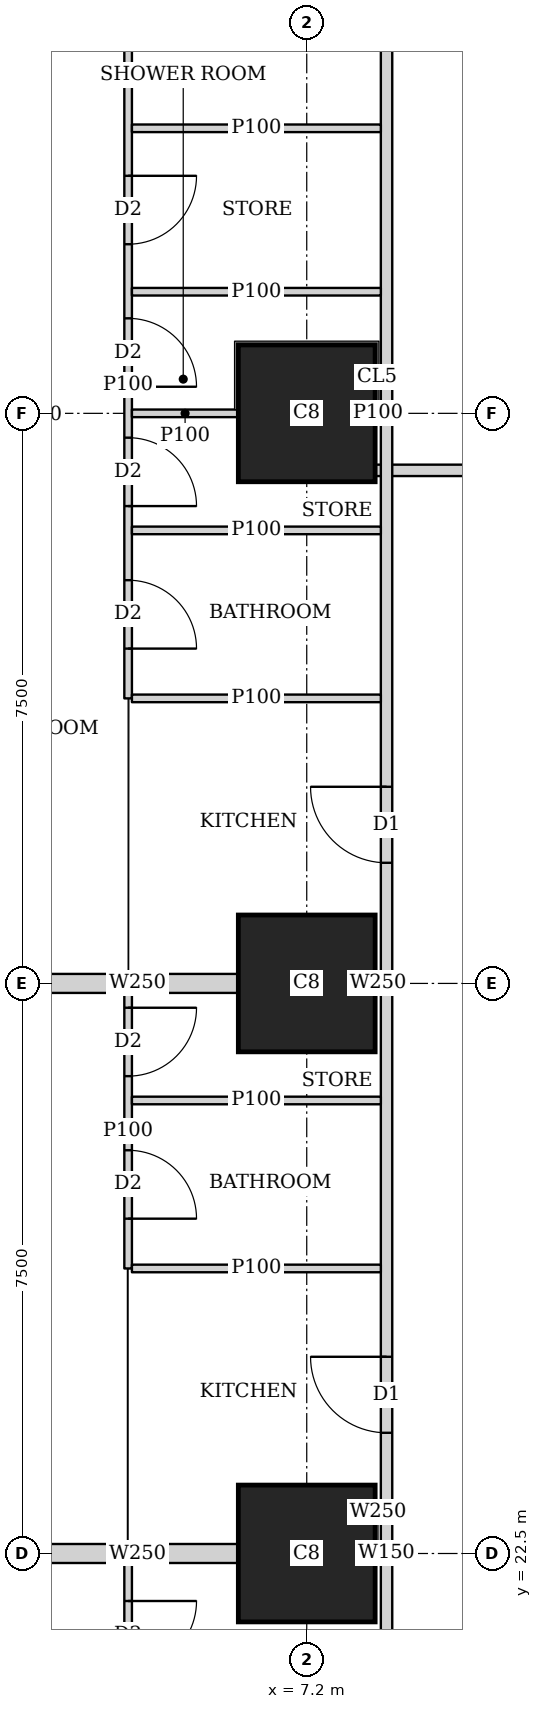
"""IFC4 building model, lengths in metres.
Left out: names, types, materials, properties, quantities, classifications, styles, units other than length and angle.
Written with IfcOpenShell. Run it as: python <this file> out.ifc"""

import sys

from ifc_helpers import new_model, si_unit, direction, frame, frame_2d, origin, origin_2d, place, context, subcontext, project, spatial, rectangle, extrude, element, fill, save


model = new_model("IFC4")
c1 = context("Model", 3, precision=1e-05, world=origin(), true_north=direction((0.0, 1.0)))
c2 = subcontext(c1, "Body", "Model", "MODEL_VIEW")
j1 = project(units=[si_unit("LENGTHUNIT", "METRE"), si_unit("PLANEANGLEUNIT", "RADIAN")], contexts=[c1])
p1 = place(None, origin())
s1 = spatial("IfcSite", under=j1, at=p1, CompositionType="ELEMENT")
p2 = place(p1, origin())
s2 = spatial("IfcBuilding", under=s1, at=p2, CompositionType="ELEMENT")
p3 = place(p2, frame((0.0, 0.0, 53.75)))
s3 = spatial("IfcBuildingStorey", under=s2, at=p3, CompositionType="ELEMENT", Elevation=53.75)
for number, where, z_axis, x_axis in (
    (1, (7.2, 22.5, 0.0), (0.0, 0.0, 1.0), (1.0, 0.0, 0.0)),
    (2, (7.2, 30.0, 0.0), (0.0, 0.0, 1.0), (1.0, 0.0, 0.0)),
    (3, (7.2, 37.5, 0.0), (0.0, 0.0, 1.0), (1.0, 0.0, 0.0)),
):
    element("IfcColumn", number, at=place(p3, frame(where, z_axis=z_axis, x_axis=x_axis)), inside=s3, PredefinedType="COLUMN", context=c2, shape_type="SweptSolid", body=[
        extrude(rectangle(XDim=1.8, YDim=1.8, at=origin_2d()), origin(), (0.0, 0.0, 1.0), 3.75),
    ])
p4 = place(p3, frame((8.25, 2.426, 0.0), z_axis=(0.0, 0.0, 1.0), x_axis=(0.0, 1.0, 0.0)))
e4 = element("IfcWall", 4, at=p4, inside=s3, PredefinedType="SOLIDWALL", context=c2, shape_type="SweptSolid", body=[
    extrude(rectangle(XDim=40.173, YDim=0.15, at=frame_2d((20.086, 0.0))), origin(), (0.0, 0.0, 1.0), 3.5),
])
p5 = place(p4, frame((6.661, 0.0, 0.0)))
e5 = element("IfcOpeningElement", 5, at=p5, cuts=e4, PredefinedType="OPENING", context=c2, shape_type="SweptSolid", body=[
    extrude(rectangle(XDim=1.0, YDim=2.1, at=frame_2d((0.5, 1.05))), frame((0.0, 0.085, 0.0), z_axis=(0.0, -1.0, 0.0), x_axis=(1.0, 0.0, 0.0)), (0.0, 0.0, 1.0), 0.17),
])
p6 = place(p4, frame((9.986, 0.0, 0.0)))
e6 = element("IfcOpeningElement", 6, at=p6, cuts=e4, PredefinedType="OPENING", context=c2, shape_type="SweptSolid", body=[
    extrude(rectangle(XDim=1.0, YDim=2.1, at=frame_2d((0.5, 1.05))), frame((0.0, 0.085, 0.0), z_axis=(0.0, -1.0, 0.0), x_axis=(1.0, 0.0, 0.0)), (0.0, 0.0, 1.0), 0.17),
])
p7 = place(p4, frame((21.662, 0.0, 0.0)))
e7 = element("IfcOpeningElement", 7, at=p7, cuts=e4, PredefinedType="OPENING", context=c2, shape_type="SweptSolid", body=[
    extrude(rectangle(XDim=1.0, YDim=2.1, at=frame_2d((0.5, 1.05))), frame((0.0, 0.085, 0.0), z_axis=(0.0, -1.0, 0.0), x_axis=(1.0, 0.0, 0.0)), (0.0, 0.0, 1.0), 0.17),
])
p8 = place(p4, frame((29.161, 0.0, 0.0)))
e8 = element("IfcOpeningElement", 8, at=p8, cuts=e4, PredefinedType="OPENING", context=c2, shape_type="SweptSolid", body=[
    extrude(rectangle(XDim=1.0, YDim=2.1, at=frame_2d((0.5, 1.05))), frame((0.0, 0.085, 0.0), z_axis=(0.0, -1.0, 0.0), x_axis=(1.0, 0.0, 0.0)), (0.0, 0.0, 1.0), 0.17),
])
p9 = place(p3, frame((8.1, 36.75, 0.0), z_axis=(0.0, 0.0, 1.0), x_axis=(1.0, 0.0, 0.0)))
e9 = element("IfcWall", 9, at=p9, inside=s3, PredefinedType="SOLIDWALL", context=c2, shape_type="SweptSolid", body=[
    extrude(rectangle(XDim=5.399, YDim=0.15, at=frame_2d((2.699, 0.0))), origin(), (0.0, 0.0, 1.0), 3.5),
])
p10 = place(p9, frame((2.725, 0.0, 0.0)))
e10 = element("IfcOpeningElement", 10, at=p10, cuts=e9, PredefinedType="OPENING", context=c2, shape_type="SweptSolid", body=[
    extrude(rectangle(XDim=1.0, YDim=2.1, at=frame_2d((0.5, 1.05))), frame((0.0, 0.085, 0.0), z_axis=(0.0, -1.0, 0.0), x_axis=(1.0, 0.0, 0.0)), (0.0, 0.0, 1.0), 0.17),
])
p11 = place(p3, frame((4.85, 15.0, 0.0), z_axis=(0.0, 0.0, 1.0), x_axis=(0.0, 1.0, 0.0)))
e11 = element("IfcWall", 11, at=p11, inside=s3, PredefinedType="PARTITIONING", context=c2, shape_type="SweptSolid", body=[
    extrude(rectangle(XDim=7.375, YDim=0.1, at=frame_2d((3.688, 0.0))), origin(), (0.0, 0.0, 1.0), 3.5),
])
p12 = place(p11, frame((0.655, 0.0, 0.0)))
e12 = element("IfcOpeningElement", 12, at=p12, cuts=e11, PredefinedType="OPENING", context=c2, shape_type="SweptSolid", body=[
    extrude(rectangle(XDim=0.9, YDim=2.1, at=frame_2d((0.45, 1.05))), frame((0.0, 0.06, 0.0), z_axis=(0.0, -1.0, 0.0), x_axis=(1.0, 0.0, 0.0)), (0.0, 0.0, 1.0), 0.12),
])
p13 = place(p11, frame((4.1, 0.0, 0.0)))
e13 = element("IfcOpeningElement", 13, at=p13, cuts=e11, PredefinedType="OPENING", context=c2, shape_type="SweptSolid", body=[
    extrude(rectangle(XDim=0.9, YDim=2.1, at=frame_2d((0.45, 1.05))), frame((0.0, 0.06, 0.0), z_axis=(0.0, -1.0, 0.0), x_axis=(1.0, 0.0, 0.0)), (0.0, 0.0, 1.0), 0.12),
])
p14 = place(p11, frame((2.53, 0.0, 0.0)))
e14 = element("IfcOpeningElement", 14, at=p14, cuts=e11, PredefinedType="OPENING", context=c2, shape_type="SweptSolid", body=[
    extrude(rectangle(XDim=0.9, YDim=2.1, at=frame_2d((0.45, 1.05))), frame((0.0, 0.06, 0.0), z_axis=(0.0, -1.0, 0.0), x_axis=(1.0, 0.0, 0.0)), (0.0, 0.0, 1.0), 0.12),
])
p15 = place(p11, frame((5.975, 0.0, 0.0)))
e15 = element("IfcOpeningElement", 15, at=p15, cuts=e11, PredefinedType="OPENING", context=c2, shape_type="SweptSolid", body=[
    extrude(rectangle(XDim=0.9, YDim=2.1, at=frame_2d((0.45, 1.05))), frame((0.0, 0.06, 0.0), z_axis=(0.0, -1.0, 0.0), x_axis=(1.0, 0.0, 0.0)), (0.0, 0.0, 1.0), 0.12),
])
p16 = place(p3, frame((4.85, 26.25, 0.0), z_axis=(0.0, 0.0, 1.0), x_axis=(0.0, 1.0, 0.0)))
e16 = element("IfcWall", 16, at=p16, inside=s3, PredefinedType="PARTITIONING", context=c2, shape_type="SweptSolid", body=[
    extrude(rectangle(XDim=3.625, YDim=0.1, at=frame_2d((1.812, 0.0))), origin(), (0.0, 0.0, 1.0), 3.5),
])
p17 = place(p16, frame((0.655, 0.0, 0.0)))
e17 = element("IfcOpeningElement", 17, at=p17, cuts=e16, PredefinedType="OPENING", context=c2, shape_type="SweptSolid", body=[
    extrude(rectangle(XDim=0.9, YDim=2.1, at=frame_2d((0.45, 1.05))), frame((0.0, 0.06, 0.0), z_axis=(0.0, -1.0, 0.0), x_axis=(1.0, 0.0, 0.0)), (0.0, 0.0, 1.0), 0.12),
])
p18 = place(p16, frame((2.53, 0.0, 0.0)))
e18 = element("IfcOpeningElement", 18, at=p18, cuts=e16, PredefinedType="OPENING", context=c2, shape_type="SweptSolid", body=[
    extrude(rectangle(XDim=0.9, YDim=2.1, at=frame_2d((0.45, 1.05))), frame((0.0, 0.06, 0.0), z_axis=(0.0, -1.0, 0.0), x_axis=(1.0, 0.0, 0.0)), (0.0, 0.0, 1.0), 0.12),
])
for number, where, z_axis, x_axis in (
    (19, (4.9, 26.25, 0.0), (0.0, 0.0, 1.0), (1.0, 0.0, 0.0)),
    (20, (4.9, 28.46, 0.0), (0.0, 0.0, 1.0), (1.0, 0.0, 0.0)),
):
    element("IfcWall", number, at=place(p3, frame(where, z_axis=z_axis, x_axis=x_axis)), inside=s3, PredefinedType="PARTITIONING", context=c2, shape_type="SweptSolid", body=[
        extrude(rectangle(XDim=3.275, YDim=0.1, at=frame_2d((1.638, 0.0))), origin(), (0.0, 0.0, 1.0), 3.5),
    ])
p19 = place(p3, frame((3.65, 22.5, 0.0), z_axis=(0.0, 0.0, 1.0), x_axis=(1.0, 0.0, 0.0)))
e21 = element("IfcWall", 21, at=p19, inside=s3, PredefinedType="SOLIDWALL", context=c2, shape_type="SweptSolid", body=[
    extrude(rectangle(XDim=2.649, YDim=0.25, at=frame_2d((1.325, 0.0))), origin(), (0.0, 0.0, 1.0), 3.5),
])
p20 = place(p3, frame((8.101, 22.5, 0.0), z_axis=(0.0, 0.0, 1.0), x_axis=(1.0, 0.0, 0.0)))
e22 = element("IfcWall", 22, at=p20, inside=s3, PredefinedType="SOLIDWALL", context=c2, shape_type="SweptSolid", body=[
    extrude(rectangle(XDim=0.074, YDim=0.25, at=frame_2d((0.037, 0.0))), origin(), (0.0, 0.0, 1.0), 3.5),
])
p21 = place(p3, frame((4.85, 33.75, 0.0), z_axis=(0.0, 0.0, 1.0), x_axis=(0.0, 1.0, 0.0)))
e23 = element("IfcWall", 23, at=p21, inside=s3, PredefinedType="PARTITIONING", context=c2, shape_type="SweptSolid", body=[
    extrude(rectangle(XDim=8.244, YDim=0.1, at=frame_2d((4.122, 0.0))), origin(), (0.0, 0.0, 1.0), 3.5),
])
p22 = place(p21, frame((0.655, 0.0, 0.0)))
e24 = element("IfcOpeningElement", 24, at=p22, cuts=e23, PredefinedType="OPENING", context=c2, shape_type="SweptSolid", body=[
    extrude(rectangle(XDim=0.9, YDim=2.1, at=frame_2d((0.45, 1.05))), frame((0.0, 0.06, 0.0), z_axis=(0.0, -1.0, 0.0), x_axis=(1.0, 0.0, 0.0)), (0.0, 0.0, 1.0), 0.12),
])
p23 = place(p21, frame((4.1, 0.0, 0.0)))
e25 = element("IfcOpeningElement", 25, at=p23, cuts=e23, PredefinedType="OPENING", context=c2, shape_type="SweptSolid", body=[
    extrude(rectangle(XDim=0.9, YDim=2.1, at=frame_2d((0.45, 1.05))), frame((0.0, 0.06, 0.0), z_axis=(0.0, -1.0, 0.0), x_axis=(1.0, 0.0, 0.0)), (0.0, 0.0, 1.0), 0.12),
])
p24 = place(p21, frame((2.53, 0.0, 0.0)))
e26 = element("IfcOpeningElement", 26, at=p24, cuts=e23, PredefinedType="OPENING", context=c2, shape_type="SweptSolid", body=[
    extrude(rectangle(XDim=0.9, YDim=2.1, at=frame_2d((0.45, 1.05))), frame((0.0, 0.06, 0.0), z_axis=(0.0, -1.0, 0.0), x_axis=(1.0, 0.0, 0.0)), (0.0, 0.0, 1.0), 0.12),
])
p25 = place(p21, frame((5.975, 0.0, 0.0)))
e27 = element("IfcOpeningElement", 27, at=p25, cuts=e23, PredefinedType="OPENING", context=c2, shape_type="SweptSolid", body=[
    extrude(rectangle(XDim=0.9, YDim=2.1, at=frame_2d((0.45, 1.05))), frame((0.0, 0.06, 0.0), z_axis=(0.0, -1.0, 0.0), x_axis=(1.0, 0.0, 0.0)), (0.0, 0.0, 1.0), 0.12),
])
p26 = place(p3, frame((4.85, 41.994, 0.0), z_axis=(0.0, 0.0, 1.0), x_axis=(0.0, 1.0, 0.0)))
e28 = element("IfcWall", 28, at=p26, inside=s3, PredefinedType="PARTITIONING", context=c2, shape_type="SweptSolid", body=[
    extrude(rectangle(XDim=2.901, YDim=0.1, at=frame_2d((1.451, 0.0))), origin(), (0.0, 0.0, 1.0), 2.05),
])
p27 = place(p3, frame((4.9, 33.75, 0.0), z_axis=(0.0, 0.0, 1.0), x_axis=(1.0, 0.0, 0.0)))
e29 = element("IfcWall", 29, at=p27, inside=s3, PredefinedType="PARTITIONING", context=c2, shape_type="SweptSolid", body=[
    extrude(rectangle(XDim=3.275, YDim=0.1, at=frame_2d((1.638, 0.0))), origin(), (0.0, 0.0, 1.0), 3.5),
])
p28 = place(p3, frame((4.9, 37.5, 0.0), z_axis=(0.0, 0.0, 1.0), x_axis=(1.0, 0.0, 0.0)))
e30 = element("IfcWall", 30, at=p28, inside=s3, PredefinedType="PARTITIONING", context=c2, shape_type="SweptSolid", body=[
    extrude(rectangle(XDim=1.399, YDim=0.1, at=frame_2d((0.7, 0.0))), origin(), (0.0, 0.0, 1.0), 3.5),
])
p29 = place(p3, frame((8.101, 37.5, 0.0), z_axis=(0.0, 0.0, 1.0), x_axis=(1.0, 0.0, 0.0)))
e31 = element("IfcWall", 31, at=p29, inside=s3, PredefinedType="PARTITIONING", context=c2, shape_type="SweptSolid", body=[
    extrude(rectangle(XDim=0.074, YDim=0.1, at=frame_2d((0.037, 0.0))), origin(), (0.0, 0.0, 1.0), 3.5),
])
for number, where, z_axis, x_axis in (
    (32, (4.9, 41.25, 0.0), (0.0, 0.0, 1.0), (1.0, 0.0, 0.0)),
    (33, (4.9, 35.96, 0.0), (0.0, 0.0, 1.0), (1.0, 0.0, 0.0)),
    (34, (4.9, 39.1, 0.0), (0.0, 0.0, 1.0), (1.0, 0.0, 0.0)),
):
    element("IfcWall", number, at=place(p3, frame(where, z_axis=z_axis, x_axis=x_axis)), inside=s3, PredefinedType="PARTITIONING", context=c2, shape_type="SweptSolid", body=[
        extrude(rectangle(XDim=3.275, YDim=0.1, at=frame_2d((1.638, 0.0))), origin(), (0.0, 0.0, 1.0), 3.5),
    ])
p30 = place(p3, frame((3.65, 30.0, 0.0), z_axis=(0.0, 0.0, 1.0), x_axis=(1.0, 0.0, 0.0)))
e35 = element("IfcWall", 35, at=p30, inside=s3, PredefinedType="SOLIDWALL", context=c2, shape_type="SweptSolid", body=[
    extrude(rectangle(XDim=2.649, YDim=0.25, at=frame_2d((1.325, 0.0))), origin(), (0.0, 0.0, 1.0), 3.5),
])
p31 = place(p3, frame((8.101, 30.0, 0.0), z_axis=(0.0, 0.0, 1.0), x_axis=(1.0, 0.0, 0.0)))
e36 = element("IfcWall", 36, at=p31, inside=s3, PredefinedType="SOLIDWALL", context=c2, shape_type="SweptSolid", body=[
    extrude(rectangle(XDim=0.074, YDim=0.25, at=frame_2d((0.037, 0.0))), origin(), (0.0, 0.0, 1.0), 3.5),
])
p32 = place(p15, origin())
e37 = element("IfcDoor", 37, at=p32, inside=s3, OperationType="SINGLE_SWING_LEFT", PredefinedType="DOOR", context=c2, shape_type="SweptSolid", body=[
    extrude(rectangle(XDim=0.9, YDim=2.1, at=frame_2d((0.45, 1.05))), frame((0.0, 0.025, 0.0), z_axis=(0.0, -1.0, 0.0), x_axis=(1.0, 0.0, 0.0)), (0.0, 0.0, 1.0), 0.05),
])
fill(e15, e37)
p33 = place(p17, origin())
e38 = element("IfcDoor", 38, at=p33, inside=s3, OperationType="SINGLE_SWING_RIGHT", PredefinedType="DOOR", context=c2, shape_type="SweptSolid", body=[
    extrude(rectangle(XDim=0.9, YDim=2.1, at=frame_2d((0.45, 1.05))), frame((0.0, 0.025, 0.0), z_axis=(0.0, -1.0, 0.0), x_axis=(1.0, 0.0, 0.0)), (0.0, 0.0, 1.0), 0.05),
])
fill(e17, e38)
p34 = place(p18, origin())
e39 = element("IfcDoor", 39, at=p34, inside=s3, OperationType="SINGLE_SWING_LEFT", PredefinedType="DOOR", context=c2, shape_type="SweptSolid", body=[
    extrude(rectangle(XDim=0.9, YDim=2.1, at=frame_2d((0.45, 1.05))), frame((0.0, 0.025, 0.0), z_axis=(0.0, -1.0, 0.0), x_axis=(1.0, 0.0, 0.0)), (0.0, 0.0, 1.0), 0.05),
])
fill(e18, e39)
p35 = place(p7, origin())
e40 = element("IfcDoor", 40, at=p35, inside=s3, OperationType="SINGLE_SWING_RIGHT", PredefinedType="DOOR", context=c2, shape_type="SweptSolid", body=[
    extrude(rectangle(XDim=1.0, YDim=2.1, at=frame_2d((0.5, 1.05))), frame((0.0, 0.025, 0.0), z_axis=(0.0, -1.0, 0.0), x_axis=(1.0, 0.0, 0.0)), (0.0, 0.0, 1.0), 0.05),
])
fill(e7, e40)
p36 = place(p22, origin())
e41 = element("IfcDoor", 41, at=p36, inside=s3, OperationType="SINGLE_SWING_RIGHT", PredefinedType="DOOR", context=c2, shape_type="SweptSolid", body=[
    extrude(rectangle(XDim=0.9, YDim=2.1, at=frame_2d((0.45, 1.05))), frame((0.0, 0.025, 0.0), z_axis=(0.0, -1.0, 0.0), x_axis=(1.0, 0.0, 0.0)), (0.0, 0.0, 1.0), 0.05),
])
fill(e24, e41)
p37 = place(p23, origin())
e42 = element("IfcDoor", 42, at=p37, inside=s3, OperationType="SINGLE_SWING_RIGHT", PredefinedType="DOOR", context=c2, shape_type="SweptSolid", body=[
    extrude(rectangle(XDim=0.9, YDim=2.1, at=frame_2d((0.45, 1.05))), frame((0.0, 0.025, 0.0), z_axis=(0.0, -1.0, 0.0), x_axis=(1.0, 0.0, 0.0)), (0.0, 0.0, 1.0), 0.05),
])
fill(e25, e42)
p38 = place(p24, origin())
e43 = element("IfcDoor", 43, at=p38, inside=s3, OperationType="SINGLE_SWING_RIGHT", PredefinedType="DOOR", context=c2, shape_type="SweptSolid", body=[
    extrude(rectangle(XDim=0.9, YDim=2.1, at=frame_2d((0.45, 1.05))), frame((0.0, 0.025, 0.0), z_axis=(0.0, -1.0, 0.0), x_axis=(1.0, 0.0, 0.0)), (0.0, 0.0, 1.0), 0.05),
])
fill(e26, e43)
p39 = place(p25, origin())
e44 = element("IfcDoor", 44, at=p39, inside=s3, OperationType="SINGLE_SWING_LEFT", PredefinedType="DOOR", context=c2, shape_type="SweptSolid", body=[
    extrude(rectangle(XDim=0.9, YDim=2.1, at=frame_2d((0.45, 1.05))), frame((0.0, 0.025, 0.0), z_axis=(0.0, -1.0, 0.0), x_axis=(1.0, 0.0, 0.0)), (0.0, 0.0, 1.0), 0.05),
])
fill(e27, e44)
p40 = place(p8, origin())
e45 = element("IfcDoor", 45, at=p40, inside=s3, OperationType="SINGLE_SWING_RIGHT", PredefinedType="DOOR", context=c2, shape_type="SweptSolid", body=[
    extrude(rectangle(XDim=1.0, YDim=2.1, at=frame_2d((0.5, 1.05))), frame((0.0, 0.025, 0.0), z_axis=(0.0, -1.0, 0.0), x_axis=(1.0, 0.0, 0.0)), (0.0, 0.0, 1.0), 0.05),
])
fill(e8, e45)
save(model, sys.argv[1])
